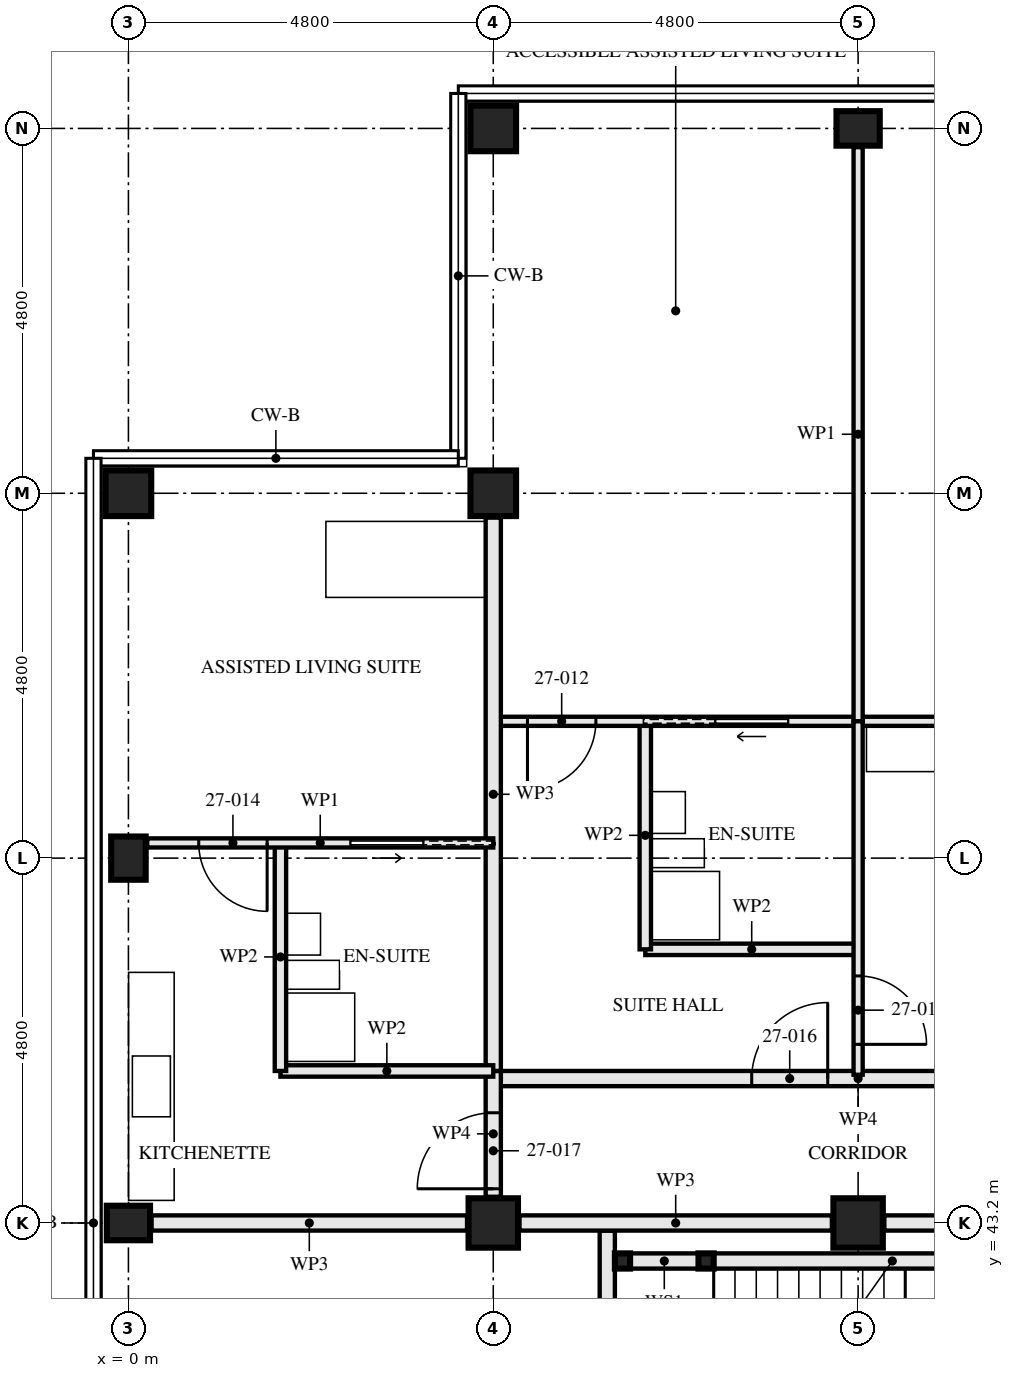
"""IFC4 building model, lengths in metres.
Left out: names, types, materials, properties, quantities, classifications, styles, units other than length and angle.
Written with IfcOpenShell. Run it as: python <this file> out.ifc"""

import sys

from ifc_helpers import new_model, si_unit, direction, frame, frame_2d, origin, origin_2d, place, context, subcontext, project, spatial, rectangle, hollow_rectangle, i_section, extrude, element, fill, save


model = new_model("IFC4")
c1 = context("Model", 3, precision=1e-05, world=origin(), true_north=direction((0.0, 1.0)))
c2 = subcontext(c1, "Body", "Model", "MODEL_VIEW")
j1 = project(units=[si_unit("LENGTHUNIT", "METRE"), si_unit("PLANEANGLEUNIT", "RADIAN")], contexts=[c1])
p1 = place(None, origin())
s1 = spatial("IfcSite", under=j1, at=p1, CompositionType="ELEMENT")
p2 = place(p1, origin())
s2 = spatial("IfcBuilding", under=s1, at=p2, CompositionType="ELEMENT")
p3 = place(p2, frame((0.0, 0.0, 101.5)))
s3 = spatial("IfcBuildingStorey", under=s2, at=p3, CompositionType="ELEMENT", Elevation=101.5)
for number, where, z_axis, x_axis in (
    (1, (0.0, 43.2, 0.0), (0.0, 0.0, 1.0), (0.0, 1.0, 0.0)),
    (2, (0.0, 48.0, 0.0), (0.0, 0.0, 1.0), (1.0, 0.0, 0.0)),
):
    element("IfcColumn", number, at=place(p3, frame(where, z_axis=z_axis, x_axis=x_axis)), inside=s3, PredefinedType="COLUMN", context=c2, shape_type="SweptSolid", body=[
        extrude(i_section(OverallWidth=0.454, OverallDepth=0.569, WebThickness=0.078, FlangeThickness=0.125, FilletRadius=0.015, at=origin_2d()), origin(), (0.0, 0.0, 1.0), 3.5),
    ])
p4 = place(p3, frame((0.0, 52.8, 0.0), z_axis=(0.0, 0.0, 1.0), x_axis=(0.0, 1.0, 0.0)))
e3 = element("IfcColumn", 3, at=p4, inside=s3, PredefinedType="COLUMN", context=c2, shape_type="SweptSolid", body=[
    extrude(hollow_rectangle(XDim=0.6, YDim=0.6, WallThickness=0.05, at=origin_2d()), origin(), (0.0, 0.0, 1.0), 3.5),
])
p5 = place(p3, frame((4.8, 43.2, 0.0), z_axis=(0.0, 0.0, 1.0), x_axis=(0.0, 1.0, 0.0)))
e4 = element("IfcColumn", 4, at=p5, inside=s3, PredefinedType="COLUMN", context=c2, shape_type="SweptSolid", body=[
    extrude(hollow_rectangle(XDim=0.65, YDim=0.65, WallThickness=0.05, at=origin_2d()), origin(), (0.0, 0.0, 1.0), 3.5),
])
for number, where, z_axis, x_axis in (
    (5, (4.8, 52.8, 0.0), (0.0, 0.0, 1.0), (0.0, 1.0, 0.0)),
    (6, (4.8, 57.6, 0.0), (0.0, 0.0, 1.0), (0.0, 1.0, 0.0)),
):
    element("IfcColumn", number, at=place(p3, frame(where, z_axis=z_axis, x_axis=x_axis)), inside=s3, PredefinedType="COLUMN", context=c2, shape_type="SweptSolid", body=[
        extrude(hollow_rectangle(XDim=0.6, YDim=0.6, WallThickness=0.05, at=origin_2d()), origin(), (0.0, 0.0, 1.0), 3.5),
    ])
p6 = place(p3, frame((9.6, 43.2, 0.0), z_axis=(0.0, 0.0, 1.0), x_axis=(0.0, 1.0, 0.0)))
e7 = element("IfcColumn", 7, at=p6, inside=s3, PredefinedType="COLUMN", context=c2, shape_type="SweptSolid", body=[
    extrude(hollow_rectangle(XDim=0.65, YDim=0.65, WallThickness=0.05, at=origin_2d()), origin(), (0.0, 0.0, 1.0), 3.5),
])
p7 = place(p3, frame((9.6, 57.6, 0.0), z_axis=(0.0, 0.0, 1.0), x_axis=(0.0, 1.0, 0.0)))
e8 = element("IfcColumn", 8, at=p7, inside=s3, PredefinedType="COLUMN", context=c2, shape_type="SweptSolid", body=[
    extrude(i_section(OverallWidth=0.454, OverallDepth=0.569, WebThickness=0.078, FlangeThickness=0.125, FilletRadius=0.015, at=origin_2d()), origin(), (0.0, 0.0, 1.0), 3.5),
])
for number, where, z_axis, x_axis in (
    (9, (6.5, 42.7, 0.0), (0.0, 0.0, 1.0), (1.0, 0.0, 0.0)),
    (10, (7.6, 42.7, 0.0), (0.0, 0.0, 1.0), (1.0, 0.0, 0.0)),
):
    element("IfcColumn", number, at=place(p3, frame(where, z_axis=z_axis, x_axis=x_axis)), inside=s3, PredefinedType="COLUMN", context=c2, shape_type="SweptSolid", body=[
        extrude(hollow_rectangle(XDim=0.2, YDim=0.2, WallThickness=0.008, at=origin_2d()), origin(), (0.0, 0.0, 1.0), 3.33),
    ])
p8 = place(p3, frame((6.6, 42.7, 0.0), z_axis=(0.0, 0.0, 1.0), x_axis=(1.0, 0.0, 0.0)))
e11 = element("IfcWall", 11, at=p8, inside=s3, PredefinedType="SOLIDWALL", context=c2, shape_type="SweptSolid", body=[
    extrude(rectangle(XDim=0.9, YDim=0.2, at=frame_2d((0.45, 0.0))), origin(), (0.0, 0.0, 1.0), 2.99),
])
p9 = place(p3, frame((7.7, 42.7, 0.0), z_axis=(0.0, 0.0, 1.0), x_axis=(1.0, 0.0, 0.0)))
e12 = element("IfcWall", 12, at=p9, inside=s3, PredefinedType="SOLIDWALL", context=c2, shape_type="SweptSolid", body=[
    extrude(rectangle(XDim=4.7, YDim=0.2, at=frame_2d((2.35, 0.0))), origin(), (0.0, 0.0, 1.0), 2.99),
])
p10 = place(p3, frame((6.3, 43.1, 0.0), z_axis=(0.0, 0.0, 1.0), x_axis=(0.0, -1.0, 0.0)))
e13 = element("IfcWall", 13, at=p10, inside=s3, PredefinedType="SOLIDWALL", context=c2, shape_type="SweptSolid", body=[
    extrude(rectangle(XDim=3.3, YDim=0.2, at=frame_2d((1.65, 0.0))), origin(), (0.0, 0.0, 1.0), 3.33),
])
p11 = place(p3, frame((6.8, 49.8, 0.0), z_axis=(0.0, 0.0, 1.0), x_axis=(0.0, -1.0, 0.0)))
e14 = element("IfcWall", 14, at=p11, inside=s3, PredefinedType="PARTITIONING", context=c2, shape_type="SweptSolid", body=[
    extrude(rectangle(XDim=3.0, YDim=0.15, at=frame_2d((1.5, 0.0))), origin(), (0.0, 0.0, 1.0), 2.55),
])
p12 = place(p3, frame((9.6, 46.8, 0.0), z_axis=(0.0, 0.0, 1.0), x_axis=(-1.0, 0.0, 0.0)))
e15 = element("IfcWall", 15, at=p12, inside=s3, PredefinedType="PARTITIONING", context=c2, shape_type="SweptSolid", body=[
    extrude(rectangle(XDim=2.8, YDim=0.15, at=frame_2d((1.4, 0.0))), origin(), (0.0, 0.0, 1.0), 3.33),
])
p13 = place(p3, frame((9.6, 49.8, 0.0), z_axis=(0.0, 0.0, 1.0), x_axis=(0.0, -1.0, 0.0)))
e16 = element("IfcWall", 16, at=p13, inside=s3, PredefinedType="PARTITIONING", context=c2, shape_type="SweptSolid", body=[
    extrude(rectangle(XDim=4.65, YDim=0.12, at=frame_2d((2.325, 0.0))), origin(), (0.0, 0.0, 1.0), 2.55),
])
p14 = place(p13, frame((3.35, 0.0, 0.0)))
e17 = element("IfcOpeningElement", 17, at=p14, cuts=e16, PredefinedType="OPENING", context=c2, shape_type="SweptSolid", body=[
    extrude(rectangle(XDim=0.9, YDim=2.1, at=frame_2d((0.45, 1.05))), frame((0.0, 0.071, 0.0), z_axis=(0.0, -1.0, 0.0), x_axis=(1.0, 0.0, 0.0)), (0.0, 0.0, 1.0), 0.141),
])
p15 = place(p3, frame((14.4, 49.8, 0.0), z_axis=(0.0, 0.0, 1.0), x_axis=(-1.0, 0.0, 0.0)))
e18 = element("IfcWall", 18, at=p15, inside=s3, PredefinedType="PARTITIONING", context=c2, shape_type="SweptSolid", body=[
    extrude(rectangle(XDim=4.8, YDim=0.12, at=frame_2d((2.4, 0.0))), origin(), (0.0, 0.0, 1.0), 3.33),
])
p16 = place(p15, frame((0.45, 0.0, 0.0)))
e19 = element("IfcOpeningElement", 19, at=p16, cuts=e18, PredefinedType="OPENING", context=c2, shape_type="SweptSolid", body=[
    extrude(rectangle(XDim=0.9, YDim=2.1, at=frame_2d((0.45, 1.05))), frame((0.0, 0.071, 0.0), z_axis=(0.0, -1.0, 0.0), x_axis=(1.0, 0.0, 0.0)), (0.0, 0.0, 1.0), 0.141),
])
p17 = place(p3, frame((9.6, 49.8, 0.0), z_axis=(0.0, 0.0, 1.0), x_axis=(-1.0, 0.0, 0.0)))
e20 = element("IfcWall", 20, at=p17, inside=s3, PredefinedType="PARTITIONING", context=c2, shape_type="SweptSolid", body=[
    extrude(rectangle(XDim=4.8, YDim=0.12, at=frame_2d((2.4, 0.0))), origin(), (0.0, 0.0, 1.0), 3.33),
])
p18 = place(p17, frame((3.45, 0.0, 0.0)))
e21 = element("IfcOpeningElement", 21, at=p18, cuts=e20, PredefinedType="OPENING", context=c2, shape_type="SweptSolid", body=[
    extrude(rectangle(XDim=0.9, YDim=2.1, at=frame_2d((0.45, 1.05))), frame((0.0, 0.071, 0.0), z_axis=(0.0, -1.0, 0.0), x_axis=(1.0, 0.0, 0.0)), (0.0, 0.0, 1.0), 0.141),
])
p19 = place(p17, frame((0.925, 0.0, 0.0)))
e22 = element("IfcOpeningElement", 22, at=p19, cuts=e20, PredefinedType="OPENING", context=c2, shape_type="SweptSolid", body=[
    extrude(rectangle(XDim=0.95, YDim=2.1, at=frame_2d((0.475, 1.05))), frame((0.0, 0.071, 0.0), z_axis=(0.0, -1.0, 0.0), x_axis=(1.0, 0.0, 0.0)), (0.0, 0.0, 1.0), 0.141),
])
p20 = place(p3, frame((9.6, 57.353, 0.0), z_axis=(0.0, 0.0, 1.0), x_axis=(0.0, -1.0, 0.0)))
e23 = element("IfcWall", 23, at=p20, inside=s3, PredefinedType="PARTITIONING", context=c2, shape_type="SweptSolid", body=[
    extrude(rectangle(XDim=7.553, YDim=0.12, at=frame_2d((3.776, 0.0))), origin(), (0.0, 0.0, 1.0), 2.55),
])
p21 = place(p3, frame((4.8, 52.48, 0.0), z_axis=(0.0, 0.0, 1.0), x_axis=(0.0, -1.0, 0.0)))
e24 = element("IfcWall", 24, at=p21, inside=s3, PredefinedType="PARTITIONING", context=c2, shape_type="SweptSolid", body=[
    extrude(rectangle(XDim=7.28, YDim=0.2, at=frame_2d((3.64, 0.0))), origin(), (0.0, 0.0, 1.0), 2.55),
])
p22 = place(p3, frame((2.0, 48.2, 0.0), z_axis=(0.0, 0.0, 1.0), x_axis=(0.0, -1.0, 0.0)))
e25 = element("IfcWall", 25, at=p22, inside=s3, PredefinedType="PARTITIONING", context=c2, shape_type="SweptSolid", body=[
    extrude(rectangle(XDim=3.0, YDim=0.15, at=frame_2d((1.5, 0.0))), origin(), (0.0, 0.0, 1.0), 2.55),
])
p23 = place(p3, frame((4.8, 45.2, 0.0), z_axis=(0.0, 0.0, 1.0), x_axis=(-1.0, 0.0, 0.0)))
e26 = element("IfcWall", 26, at=p23, inside=s3, PredefinedType="PARTITIONING", context=c2, shape_type="SweptSolid", body=[
    extrude(rectangle(XDim=2.8, YDim=0.15, at=frame_2d((1.4, 0.0))), origin(), (0.0, 0.0, 1.0), 3.33),
])
p24 = place(p3, frame((4.8, 48.2, 0.0), z_axis=(0.0, 0.0, 1.0), x_axis=(-1.0, 0.0, 0.0)))
e27 = element("IfcWall", 27, at=p24, inside=s3, PredefinedType="PARTITIONING", context=c2, shape_type="SweptSolid", body=[
    extrude(rectangle(XDim=4.553, YDim=0.12, at=frame_2d((2.276, 0.0))), origin(), (0.0, 0.0, 1.0), 3.33),
])
p25 = place(p24, frame((2.975, 0.0, 0.0)))
e28 = element("IfcOpeningElement", 28, at=p25, cuts=e27, PredefinedType="OPENING", context=c2, shape_type="SweptSolid", body=[
    extrude(rectangle(XDim=0.9, YDim=2.1, at=frame_2d((0.45, 1.05))), frame((0.0, 0.071, 0.0), z_axis=(0.0, -1.0, 0.0), x_axis=(1.0, 0.0, 0.0)), (0.0, 0.0, 1.0), 0.141),
])
p26 = place(p24, frame((0.925, 0.0, 0.0)))
e29 = element("IfcOpeningElement", 29, at=p26, cuts=e27, PredefinedType="OPENING", context=c2, shape_type="SweptSolid", body=[
    extrude(rectangle(XDim=0.95, YDim=2.1, at=frame_2d((0.475, 1.05))), frame((0.0, 0.071, 0.0), z_axis=(0.0, -1.0, 0.0), x_axis=(1.0, 0.0, 0.0)), (0.0, 0.0, 1.0), 0.141),
])
p27 = place(p3, frame((14.4, 45.1, 0.0), z_axis=(0.0, 0.0, 1.0), x_axis=(-1.0, 0.0, 0.0)))
e30 = element("IfcWall", 30, at=p27, inside=s3, PredefinedType="PARTITIONING", context=c2, shape_type="SweptSolid", body=[
    extrude(rectangle(XDim=9.6, YDim=0.2, at=frame_2d((4.8, 0.0))), origin(), (0.0, 0.0, 1.0), 3.33),
])
p28 = place(p27, frame((5.2, 0.0, 0.0)))
e31 = element("IfcOpeningElement", 31, at=p28, cuts=e30, PredefinedType="OPENING", context=c2, shape_type="SweptSolid", body=[
    extrude(rectangle(XDim=1.0, YDim=2.1, at=frame_2d((0.5, 1.05))), frame((0.0, 0.111, 0.0), z_axis=(0.0, -1.0, 0.0), x_axis=(1.0, 0.0, 0.0)), (0.0, 0.0, 1.0), 0.221),
])
p29 = place(p3, frame((4.8, 45.2, 0.0), z_axis=(0.0, 0.0, 1.0), x_axis=(0.0, -1.0, 0.0)))
e32 = element("IfcWall", 32, at=p29, inside=s3, PredefinedType="PARTITIONING", context=c2, shape_type="SweptSolid", body=[
    extrude(rectangle(XDim=1.655, YDim=0.2, at=frame_2d((0.828, 0.0))), origin(), (0.0, 0.0, 1.0), 3.33),
])
p30 = place(p29, frame((0.55, 0.0, 0.0)))
e33 = element("IfcOpeningElement", 33, at=p30, cuts=e32, PredefinedType="OPENING", context=c2, shape_type="SweptSolid", body=[
    extrude(rectangle(XDim=1.0, YDim=2.1, at=frame_2d((0.5, 1.05))), frame((0.0, 0.111, 0.0), z_axis=(0.0, -1.0, 0.0), x_axis=(1.0, 0.0, 0.0)), (0.0, 0.0, 1.0), 0.221),
])
p31 = place(p3, frame((12.5, 43.2, 0.0), z_axis=(0.0, 0.0, 1.0), x_axis=(-1.0, 0.0, 0.0)))
e34 = element("IfcWall", 34, at=p31, inside=s3, PredefinedType="PARTITIONING", context=c2, shape_type="SweptSolid", body=[
    extrude(rectangle(XDim=2.555, YDim=0.2, at=frame_2d((1.277, 0.0))), origin(), (0.0, 0.0, 1.0), 2.32),
])
p32 = place(p3, frame((9.255, 43.2, 0.0), z_axis=(0.0, 0.0, 1.0), x_axis=(-1.0, 0.0, 0.0)))
e35 = element("IfcWall", 35, at=p32, inside=s3, PredefinedType="PARTITIONING", context=c2, shape_type="SweptSolid", body=[
    extrude(rectangle(XDim=4.11, YDim=0.2, at=frame_2d((2.055, 0.0))), origin(), (0.0, 0.0, 1.0), 2.32),
])
p33 = place(p3, frame((4.455, 43.2, 0.0), z_axis=(0.0, 0.0, 1.0), x_axis=(-1.0, 0.0, 0.0)))
e36 = element("IfcWall", 36, at=p33, inside=s3, PredefinedType="PARTITIONING", context=c2, shape_type="SweptSolid", body=[
    extrude(rectangle(XDim=4.151, YDim=0.2, at=frame_2d((2.075, 0.0))), origin(), (0.0, 0.0, 1.0), 2.32),
])
p34 = place(p14, origin())
e37 = element("IfcDoor", 37, at=p34, inside=s3, OperationType="SINGLE_SWING_LEFT", PredefinedType="DOOR", context=c2, shape_type="SweptSolid", body=[
    extrude(rectangle(XDim=0.9, YDim=2.1, at=frame_2d((0.45, 1.05))), frame((0.0, 0.022, 0.0), z_axis=(0.0, -1.0, 0.0), x_axis=(1.0, 0.0, 0.0)), (0.0, 0.0, 1.0), 0.044),
])
fill(e17, e37)
p35 = place(p18, origin())
e38 = element("IfcDoor", 38, at=p35, inside=s3, OperationType="SINGLE_SWING_LEFT", PredefinedType="DOOR", context=c2, shape_type="SweptSolid", body=[
    extrude(rectangle(XDim=0.9, YDim=2.1, at=frame_2d((0.45, 1.05))), frame((0.0, 0.022, 0.0), z_axis=(0.0, -1.0, 0.0), x_axis=(1.0, 0.0, 0.0)), (0.0, 0.0, 1.0), 0.044),
])
fill(e21, e38)
p36 = place(p19, origin())
e39 = element("IfcDoor", 39, at=p36, inside=s3, OperationType="SLIDING_TO_LEFT", PredefinedType="DOOR", context=c2, shape_type="SweptSolid", body=[
    extrude(rectangle(XDim=0.95, YDim=2.1, at=frame_2d((0.475, 1.05))), frame((0.0, 0.022, 0.0), z_axis=(0.0, -1.0, 0.0), x_axis=(1.0, 0.0, 0.0)), (0.0, 0.0, 1.0), 0.044),
])
fill(e22, e39)
p37 = place(p25, origin())
e40 = element("IfcDoor", 40, at=p37, inside=s3, OperationType="SINGLE_SWING_RIGHT", PredefinedType="DOOR", context=c2, shape_type="SweptSolid", body=[
    extrude(rectangle(XDim=0.9, YDim=2.1, at=frame_2d((0.45, 1.05))), frame((0.0, 0.022, 0.0), z_axis=(0.0, -1.0, 0.0), x_axis=(1.0, 0.0, 0.0)), (0.0, 0.0, 1.0), 0.044),
])
fill(e28, e40)
p38 = place(p26, origin())
e41 = element("IfcDoor", 41, at=p38, inside=s3, OperationType="SLIDING_TO_RIGHT", PredefinedType="DOOR", context=c2, shape_type="SweptSolid", body=[
    extrude(rectangle(XDim=0.95, YDim=2.1, at=frame_2d((0.475, 1.05))), frame((0.0, 0.022, 0.0), z_axis=(0.0, -1.0, 0.0), x_axis=(1.0, 0.0, 0.0)), (0.0, 0.0, 1.0), 0.044),
])
fill(e29, e41)
p39 = place(p28, frame((1.0, 0.0, 0.0), z_axis=(0.0, 0.0, 1.0), x_axis=(-1.0, 0.0, 0.0)))
e42 = element("IfcDoor", 42, at=p39, inside=s3, OperationType="SINGLE_SWING_LEFT", PredefinedType="DOOR", context=c2, shape_type="SweptSolid", body=[
    extrude(rectangle(XDim=1.0, YDim=2.1, at=frame_2d((0.5, 1.05))), frame((0.0, 0.027, 0.0), z_axis=(0.0, -1.0, 0.0), x_axis=(1.0, 0.0, 0.0)), (0.0, 0.0, 1.0), 0.054),
])
fill(e31, e42)
p40 = place(p30, frame((1.0, 0.0, 0.0), z_axis=(0.0, 0.0, 1.0), x_axis=(-1.0, 0.0, 0.0)))
e43 = element("IfcDoor", 43, at=p40, inside=s3, OperationType="SINGLE_SWING_RIGHT", PredefinedType="DOOR", context=c2, shape_type="SweptSolid", body=[
    extrude(rectangle(XDim=1.0, YDim=2.1, at=frame_2d((0.5, 1.05))), frame((0.0, 0.027, 0.0), z_axis=(0.0, -1.0, 0.0), x_axis=(1.0, 0.0, 0.0)), (0.0, 0.0, 1.0), 0.054),
])
fill(e33, e43)
save(model, sys.argv[1])
